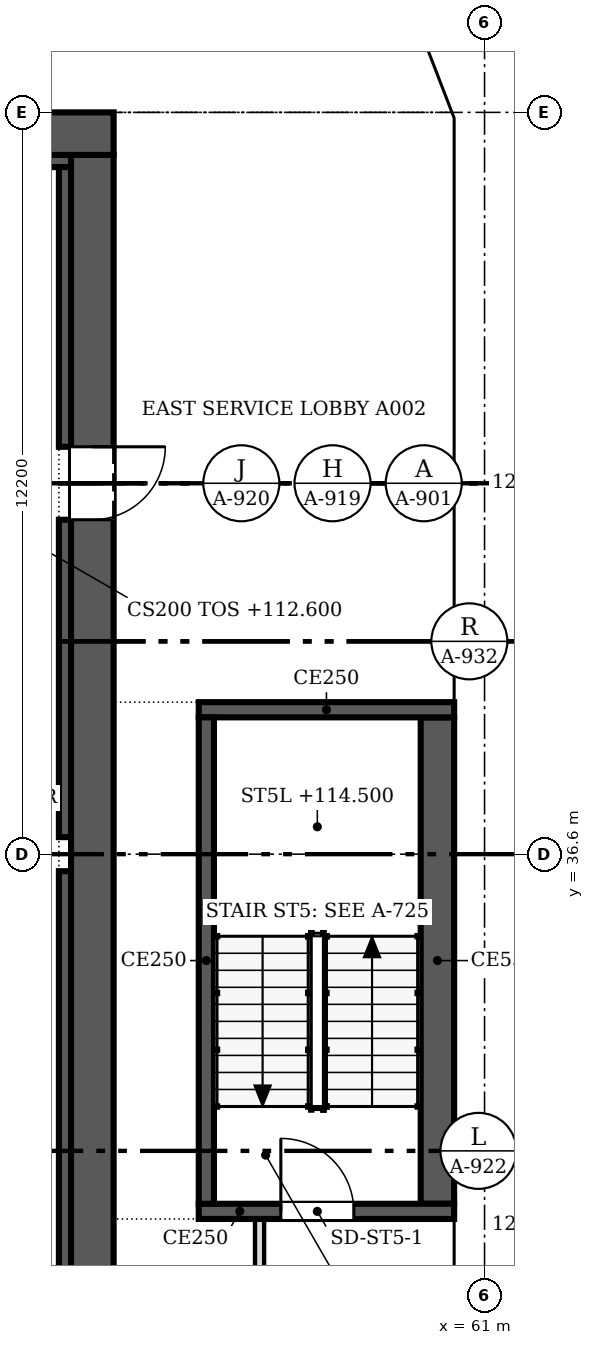
"""IFC4 building model, lengths in metres.
Left out: names, types, materials, properties, quantities, classifications, styles, units other than length and angle.
Written with IfcOpenShell. Run it as: python <this file> out.ifc"""

import sys

from ifc_helpers import new_model, si_unit, direction, frame, frame_2d, origin, place, context, subcontext, project, spatial, polyline, rectangle, outline, extrude, faceted_brep, source, transform, mapped, element, fill, save


model = new_model("IFC4")
c1 = context("Model", 3, precision=1e-05, world=origin(), true_north=direction((0.0, 1.0)))
c2 = subcontext(c1, "Body", "Model", "MODEL_VIEW")
j1 = project(units=[si_unit("LENGTHUNIT", "METRE"), si_unit("PLANEANGLEUNIT", "RADIAN")], contexts=[c1])
p1 = place(None, origin())
s1 = spatial("IfcSite", under=j1, at=p1, CompositionType="ELEMENT")
p2 = place(p1, origin())
s2 = spatial("IfcBuilding", under=s1, at=p2, CompositionType="ELEMENT")
p3 = place(p2, frame((0.0, 0.0, 112.6)))
s3 = spatial("IfcBuildingStorey", under=s2, at=p3, CompositionType="ELEMENT", Elevation=112.6)
m1 = source(origin(), c2, "Body", "SweptSolid", [
    extrude(outline(polyline([(6.1, 0.0), (3.05, 3.8), (0.0, 0.0), (6.1, 0.0)])), frame((0.0, 0.25, 0.0), z_axis=(0.0, -1.0, 0.0), x_axis=(1.0, 0.0, 0.0)), (0.0, 0.0, 1.0), 0.5),
])
p4 = place(p3, frame((60.75, 24.4, 0.0), z_axis=(0.0, 0.0, 1.0), x_axis=(0.0, 1.0, 0.0)))
e1 = element("IfcWall", 1, at=p4, inside=s3, PredefinedType="SOLIDWALL", context=c2, shape_type="MappedRepresentation", body=[
    mapped(m1, transform((0.0, 0.0, 0.0), scale=1.0)),
])
m2 = source(origin(), c2, "Body", "SweptSolid", [
    extrude(outline(polyline([(5.579, 0.25), (3.05, 3.4), (0.521, 0.25), (5.579, 0.25)])), frame((0.0, 0.26, 0.0), z_axis=(0.0, -1.0, 0.0), x_axis=(1.0, 0.0, 0.0)), (0.0, 0.0, 1.0), 0.52),
])
p5 = place(p4, origin())
e2 = element("IfcOpeningElement", 2, at=p5, cuts=e1, PredefinedType="OPENING", context=c2, shape_type="MappedRepresentation", body=[
    mapped(m2, transform((0.0, 0.0, 0.0), scale=1.0)),
])
p6 = place(p3, frame((60.75, 30.5, 0.0), z_axis=(0.0, 0.0, 1.0), x_axis=(0.0, 1.0, 0.0)))
e3 = element("IfcWall", 3, at=p6, inside=s3, PredefinedType="SOLIDWALL", context=c2, shape_type="MappedRepresentation", body=[
    mapped(m1, transform((0.0, 0.0, 0.0), scale=1.0)),
])
p7 = place(p6, origin())
e4 = element("IfcOpeningElement", 4, at=p7, cuts=e3, PredefinedType="OPENING", context=c2, shape_type="MappedRepresentation", body=[
    mapped(m2, transform((0.0, 0.0, 0.0), scale=1.0)),
])
m3 = source(origin(), c2, "Body", "Brep", [
    faceted_brep([(6.1, -0.25, 0.0), (3.05, -0.25, 3.8), (0.0, -0.25, 0.0), (6.1, -0.25, 0.0), (0.0, 0.25, 0.0), (3.05, 0.25, 3.8), (6.1, 0.25, 0.0), (6.1, 0.25, 0.0)], [[[0, 1, 2, 3]], [[4, 5, 6, 7]], [[6, 5, 1, 0]], [[5, 4, 2, 1]], [[4, 7, 3, 2]], [[3, 7, 6, 0]]]),
])
p8 = place(p3, frame((60.75, 36.6, 0.0), z_axis=(0.0, 0.0, 1.0), x_axis=(0.0, 1.0, 0.0)))
e5 = element("IfcWall", 5, at=p8, inside=s3, PredefinedType="SOLIDWALL", context=c2, shape_type="MappedRepresentation", body=[
    mapped(m3, transform((0.0, 0.0, 0.0), scale=1.0)),
])
p9 = place(p8, origin())
e6 = element("IfcOpeningElement", 6, at=p9, cuts=e5, PredefinedType="OPENING", context=c2, shape_type="MappedRepresentation", body=[
    mapped(m2, transform((0.0, 0.0, 0.0), scale=1.0)),
])
m4 = source(origin(), c2, "Body", "Brep", [
    faceted_brep([(6.053, -0.25, 0.0), (3.05, -0.25, 3.8), (0.0, -0.25, 0.0), (0.0, 0.25, 0.0), (3.05, 0.25, 3.8), (6.007, 0.25, 0.059), (6.007, 0.25, 0.0), (6.053, 0.0, 0.0)], [[[0, 1, 2]], [[3, 4, 5, 6]], [[5, 4, 1, 0, 7]], [[4, 3, 2, 1]], [[3, 6, 7, 0, 2]], [[7, 6, 5]]]),
])
p10 = place(p3, frame((60.75, 42.7, 0.0), z_axis=(0.0, 0.0, 1.0), x_axis=(0.0, 1.0, 0.0)))
e7 = element("IfcWall", 7, at=p10, inside=s3, PredefinedType="SOLIDWALL", context=c2, shape_type="MappedRepresentation", body=[
    mapped(m4, transform((0.0, 0.0, 0.0), scale=1.0)),
])
m5 = source(origin(), c2, "Body", "SweptSolid", [
    extrude(outline(polyline([(5.537, 0.25), (3.049, 3.399), (0.521, 0.25), (5.537, 0.25)])), frame((0.0, 0.26, 0.0), z_axis=(0.0, -1.0, 0.0), x_axis=(1.0, 0.0, 0.0)), (0.0, 0.0, 1.0), 0.52),
])
p11 = place(p10, origin())
e8 = element("IfcOpeningElement", 8, at=p11, cuts=e7, PredefinedType="OPENING", context=c2, shape_type="MappedRepresentation", body=[
    mapped(m5, transform((0.0, 0.0, 0.0), scale=1.0)),
])
m6 = source(origin(), c2, "Body", "Brep", [
    faceted_brep([(3.003, -0.25, 3.731), (2.95, -0.25, 3.8), (0.0, -0.25, 0.0), (3.003, -0.25, 0.0), (0.047, 0.25, 0.06), (2.898, 0.25, 3.732), (2.898, 0.25, 0.0), (0.047, 0.25, 0.0), (2.95, 0.0, 3.8), (0.0, 0.0, 0.0)], [[[0, 1, 2, 3]], [[4, 5, 6, 7]], [[8, 1, 0]], [[5, 4, 9, 2, 1, 8]], [[7, 6, 3, 2, 9]], [[7, 9, 4]], [[3, 6, 5, 8, 0]]]),
])
p12 = place(p3, frame((60.75, 48.753, 0.0), z_axis=(0.0, 0.0, 1.0), x_axis=(-0.35992665181, 0.932980602862, 0.0)))
e9 = element("IfcWall", 9, at=p12, inside=s3, PredefinedType="SOLIDWALL", context=c2, shape_type="MappedRepresentation", body=[
    mapped(m6, transform((0.0, 0.0, 0.0), scale=1.0)),
])
m7 = source(origin(), c2, "Body", "SweptSolid", [
    extrude(outline(polyline([(2.75, 3.135), (0.511, 0.25), (2.75, 0.25), (2.75, 3.135)])), frame((0.0, 0.26, 0.0), z_axis=(0.0, -1.0, 0.0), x_axis=(1.0, 0.0, 0.0)), (0.0, 0.0, 1.0), 0.52),
])
p13 = place(p12, origin())
e10 = element("IfcOpeningElement", 10, at=p13, cuts=e9, PredefinedType="OPENING", context=c2, shape_type="MappedRepresentation", body=[
    mapped(m7, transform((0.0, 0.0, 0.0), scale=1.0)),
])
p14 = place(p2, frame((0.0, 0.0, 116.4)))
s4 = spatial("IfcBuildingStorey", under=s2, at=p14, CompositionType="ELEMENT", Elevation=116.4)
m8 = source(origin(), c2, "Body", "SweptSolid", [
    extrude(outline(polyline([(3.05, 0.0), (6.1, 3.8), (3.05, 7.6), (0.0, 3.8), (3.05, 0.0)])), frame((0.0, 0.25, 0.0), z_axis=(0.0, -1.0, 0.0), x_axis=(1.0, 0.0, 0.0)), (0.0, 0.0, 1.0), 0.5),
])
p15 = place(p14, frame((60.75, 27.45, -3.8), z_axis=(0.0, 0.0, 1.0), x_axis=(0.0, 1.0, 0.0)))
e11 = element("IfcWall", 11, at=p15, inside=s4, PredefinedType="SOLIDWALL", context=c2, shape_type="MappedRepresentation", body=[
    mapped(m8, transform((0.0, 0.0, 0.0), scale=1.0)),
])
m9 = source(origin(), c2, "Body", "SweptSolid", [
    extrude(outline(polyline([(3.05, 0.399), (5.78, 3.8), (3.05, 7.2), (0.321, 3.8), (3.05, 0.399)])), frame((0.0, 0.26, 0.0), z_axis=(0.0, -1.0, 0.0), x_axis=(1.0, 0.0, 0.0)), (0.0, 0.0, 1.0), 0.52),
])
p16 = place(p15, origin())
e12 = element("IfcOpeningElement", 12, at=p16, cuts=e11, PredefinedType="OPENING", context=c2, shape_type="MappedRepresentation", body=[
    mapped(m9, transform((0.0, 0.0, 0.0), scale=1.0)),
])
m10 = source(origin(), c2, "Body", "Brep", [
    faceted_brep([(3.05, -0.25, 0.0), (6.1, -0.25, 3.8), (6.1, -0.25, 3.8), (3.05, -0.25, 7.6), (0.0, -0.25, 3.8), (0.0, 0.25, 3.8), (3.05, 0.25, 7.6), (6.1, 0.25, 3.8), (6.1, 0.25, 3.8), (3.05, 0.25, 0.0)], [[[0, 1, 2, 3, 4]], [[5, 6, 7, 8, 9]], [[9, 8, 1, 0]], [[7, 6, 3, 2]], [[6, 5, 4, 3]], [[5, 9, 0, 4]], [[1, 8, 7, 2]]]),
])
p17 = place(p14, frame((60.75, 33.55, -3.8), z_axis=(0.0, 0.0, 1.0), x_axis=(0.0, 1.0, 0.0)))
e13 = element("IfcWall", 13, at=p17, inside=s4, PredefinedType="SOLIDWALL", context=c2, shape_type="MappedRepresentation", body=[
    mapped(m10, transform((0.0, 0.0, 0.0), scale=1.0)),
])
p18 = place(p17, origin())
e14 = element("IfcOpeningElement", 14, at=p18, cuts=e13, PredefinedType="OPENING", context=c2, shape_type="MappedRepresentation", body=[
    mapped(m9, transform((0.0, 0.0, 0.0), scale=1.0)),
])
p19 = place(p14, frame((60.75, 39.65, -3.8), z_axis=(0.0, 0.0, 1.0), x_axis=(0.0, 1.0, 0.0)))
e15 = element("IfcWall", 15, at=p19, inside=s4, PredefinedType="SOLIDWALL", context=c2, shape_type="MappedRepresentation", body=[
    mapped(m8, transform((0.0, 0.0, 0.0), scale=1.0)),
])
p20 = place(p19, origin())
e16 = element("IfcOpeningElement", 16, at=p20, cuts=e15, PredefinedType="OPENING", context=c2, shape_type="MappedRepresentation", body=[
    mapped(m9, transform((0.0, 0.0, 0.0), scale=1.0)),
])
m11 = source(origin(), c2, "Body", "Brep", [
    faceted_brep([(3.003, -0.25, 0.0), (3.05, -0.25, 0.06), (3.05, -0.25, 7.54), (3.003, -0.25, 7.6), (0.0, -0.25, 3.8), (0.0, 0.25, 3.8), (2.957, 0.25, 7.541), (2.957, 0.25, 0.059), (3.003, 0.0, 0.0), (3.003, 0.0, 7.6)], [[[0, 1, 2, 3, 4]], [[5, 6, 7]], [[1, 0, 8]], [[9, 3, 2]], [[6, 5, 4, 3, 9]], [[5, 7, 8, 0, 4]], [[1, 8, 7, 6, 9, 2]]]),
])
p21 = place(p14, frame((60.75, 45.75, -3.8), z_axis=(0.0, 0.0, 1.0), x_axis=(0.0, 1.0, 0.0)))
e17 = element("IfcWall", 17, at=p21, inside=s4, PredefinedType="SOLIDWALL", context=c2, shape_type="MappedRepresentation", body=[
    mapped(m11, transform((0.0, 0.0, 0.0), scale=1.0)),
])
m12 = source(origin(), c2, "Body", "SweptSolid", [
    extrude(outline(polyline([(2.803, 6.944), (0.319, 3.8), (2.803, 0.656), (2.803, 6.944)])), frame((0.0, 0.26, 0.0), z_axis=(0.0, -1.0, 0.0), x_axis=(1.0, 0.0, 0.0)), (0.0, 0.0, 1.0), 0.52),
])
p22 = place(p21, origin())
e18 = element("IfcOpeningElement", 18, at=p22, cuts=e17, PredefinedType="OPENING", context=c2, shape_type="MappedRepresentation", body=[
    mapped(m12, transform((0.0, 0.0, 0.0), scale=1.0)),
])
m13 = source(origin(), c2, "Body", "Brep", [
    faceted_brep([(0.047, -0.25, 0.0), (2.997, -0.25, 3.8), (0.047, -0.25, 7.6), (0.0, -0.25, 7.541), (0.0, -0.25, 0.059), (0.093, 0.25, 7.54), (2.944, 0.25, 3.868), (2.944, 0.25, 3.732), (0.093, 0.25, 0.06), (2.997, 0.0, 3.8), (0.047, 0.0, 0.0), (0.047, 0.0, 7.6)], [[[0, 1, 2, 3, 4]], [[5, 6, 7, 8]], [[8, 7, 9, 1, 0, 10]], [[6, 5, 11, 2, 1, 9]], [[3, 2, 11]], [[10, 0, 4]], [[8, 10, 4, 3, 11, 5]], [[9, 7, 6]]]),
])
p23 = place(p14, frame((60.767, 48.71, -3.8), z_axis=(0.0, 0.0, 1.0), x_axis=(-0.359901446078, 0.932990326376, 0.0)))
e19 = element("IfcWall", 19, at=p23, inside=s4, PredefinedType="SOLIDWALL", context=c2, shape_type="MappedRepresentation", body=[
    mapped(m13, transform((0.0, 0.0, 0.0), scale=1.0)),
])
m14 = source(origin(), c2, "Body", "SweptSolid", [
    extrude(outline(polyline([(0.247, 0.665), (2.681, 3.8), (0.247, 6.935), (0.247, 0.665)])), frame((0.0, 0.26, 0.0), z_axis=(0.0, -1.0, 0.0), x_axis=(1.0, 0.0, 0.0)), (0.0, 0.0, 1.0), 0.52),
])
p24 = place(p23, origin())
e20 = element("IfcOpeningElement", 20, at=p24, cuts=e19, PredefinedType="OPENING", context=c2, shape_type="MappedRepresentation", body=[
    mapped(m14, transform((0.0, 0.0, 0.0), scale=1.0)),
])
p25 = place(p3, frame((30.5, 48.45, 0.0), z_axis=(0.0, 0.0, 1.0), x_axis=(1.0, 0.0, 0.0)))
e21 = element("IfcWall", 21, at=p25, inside=s3, PredefinedType="SHEAR", context=c2, shape_type="SweptSolid", body=[
    extrude(rectangle(XDim=24.4, YDim=0.7, at=frame_2d((12.2, 0.0))), origin(), (0.0, 0.0, 1.0), 3.8),
])
p26 = place(p3, frame((54.55, 48.1, 0.0), z_axis=(0.0, 0.0, 1.0), x_axis=(0.0, -1.0, 0.0)))
e22 = element("IfcWall", 22, at=p26, inside=s3, PredefinedType="SHEAR", context=c2, shape_type="SweptSolid", body=[
    extrude(rectangle(XDim=23.0, YDim=0.7, at=frame_2d((11.5, 0.0))), origin(), (0.0, 0.0, 1.0), 3.8),
])
m15 = source(origin(), c2, "Body", "SweptSolid", [
    extrude(rectangle(XDim=1.2, YDim=2.1, at=frame_2d((0.6, 1.05))), frame((0.0, 0.36, 0.0), z_axis=(0.0, -1.0, 0.0), x_axis=(1.0, 0.0, 0.0)), (0.0, 0.0, 1.0), 0.72),
])
p27 = place(p26, frame((4.8, 0.0, 0.0)))
e23 = element("IfcOpeningElement", 23, at=p27, cuts=e22, PredefinedType="OPENING", context=c2, shape_type="MappedRepresentation", body=[
    mapped(m15, transform((0.0, 0.0, 0.0), scale=1.0)),
])
p28 = place(p3, frame((31.2, 48.0, 0.0), z_axis=(0.0, 0.0, 1.0), x_axis=(1.0, 0.0, 0.0)))
e24 = element("IfcWall", 24, at=p28, inside=s3, PredefinedType="SOLIDWALL", context=c2, shape_type="SweptSolid", body=[
    extrude(rectangle(XDim=23.0, YDim=0.2, at=frame_2d((11.5, 0.0))), origin(), (0.0, 0.0, 1.0), 3.8),
])
p29 = place(p3, frame((54.1, 25.3, 0.0), z_axis=(0.0, 0.0, 1.0), x_axis=(0.0, 1.0, 0.0)))
e25 = element("IfcWall", 25, at=p29, inside=s3, PredefinedType="SOLIDWALL", context=c2, shape_type="SweptSolid", body=[
    extrude(rectangle(XDim=11.02, YDim=0.2, at=frame_2d((5.51, 0.0))), origin(), (0.0, 0.0, 1.0), 3.8),
])
p30 = place(p3, frame((54.1, 36.88, 0.0), z_axis=(0.0, 0.0, 1.0), x_axis=(0.0, 1.0, 0.0)))
e26 = element("IfcWall", 26, at=p30, inside=s3, PredefinedType="SOLIDWALL", context=c2, shape_type="SweptSolid", body=[
    extrude(rectangle(XDim=5.22, YDim=0.2, at=frame_2d((2.61, 0.0))), origin(), (0.0, 0.0, 1.0), 3.8),
])
p31 = place(p3, frame((54.1, 43.3, 0.0), z_axis=(0.0, 0.0, 1.0), x_axis=(0.0, 1.0, 0.0)))
e27 = element("IfcWall", 27, at=p31, inside=s3, PredefinedType="SOLIDWALL", context=c2, shape_type="SweptSolid", body=[
    extrude(rectangle(XDim=4.6, YDim=0.2, at=frame_2d((2.3, 0.0))), origin(), (0.0, 0.0, 1.0), 3.8),
])
p32 = place(p3, frame((60.5, 30.725, 0.0), z_axis=(0.0, 0.0, 1.0), x_axis=(-1.0, 0.0, 0.0)))
e28 = element("IfcWall", 28, at=p32, inside=s3, PredefinedType="SOLIDWALL", context=c2, shape_type="SweptSolid", body=[
    extrude(rectangle(XDim=4.2, YDim=0.25, at=frame_2d((2.1, 0.0))), origin(), (0.0, 0.0, 1.0), 3.8),
])
m16 = source(origin(), c2, "Body", "SweptSolid", [
    extrude(rectangle(XDim=1.2, YDim=2.1, at=frame_2d((0.6, 1.05))), frame((0.0, 0.135, 0.0), z_axis=(0.0, -1.0, 0.0), x_axis=(1.0, 0.0, 0.0)), (0.0, 0.0, 1.0), 0.27),
])
p33 = place(p32, frame((1.65, 0.0, 0.0)))
e29 = element("IfcOpeningElement", 29, at=p33, cuts=e28, PredefinedType="OPENING", context=c2, shape_type="MappedRepresentation", body=[
    mapped(m16, transform((0.0, 0.0, 0.0), scale=1.0)),
])
p34 = place(p3, frame((56.425, 30.85, 0.0), z_axis=(0.0, 0.0, 1.0), x_axis=(0.0, 1.0, 0.0)))
e30 = element("IfcWall", 30, at=p34, inside=s3, PredefinedType="SOLIDWALL", context=c2, shape_type="SweptSolid", body=[
    extrude(rectangle(XDim=8.0, YDim=0.25, at=frame_2d((4.0, 0.0))), origin(), (0.0, 0.0, 1.0), 3.8),
])
p35 = place(p3, frame((56.3, 38.975, 0.0), z_axis=(0.0, 0.0, 1.0), x_axis=(1.0, 0.0, 0.0)))
e31 = element("IfcWall", 31, at=p35, inside=s3, PredefinedType="SOLIDWALL", context=c2, shape_type="SweptSolid", body=[
    extrude(rectangle(XDim=4.2, YDim=0.25, at=frame_2d((2.1, 0.0))), origin(), (0.0, 0.0, 1.0), 3.8),
])
p36 = place(p3, frame((60.225, 38.85, 0.0), z_axis=(0.0, 0.0, 1.0), x_axis=(0.0, -1.0, 0.0)))
e32 = element("IfcWall", 32, at=p36, inside=s3, PredefinedType="SOLIDWALL", context=c2, shape_type="SweptSolid", body=[
    extrude(rectangle(XDim=8.0, YDim=0.55, at=frame_2d((4.0, 0.0))), origin(), (0.0, 0.0, 1.0), 3.8),
])
p37 = place(p3, frame((57.3, 30.6, 0.0), z_axis=(0.0, 0.0, 1.0), x_axis=(0.0, -1.0, 0.0)))
e33 = element("IfcWall", 33, at=p37, inside=s3, PredefinedType="PARTITIONING", context=c2, shape_type="SweptSolid", body=[
    extrude(rectangle(XDim=8.524, YDim=0.15, at=frame_2d((4.262, 0.0))), origin(), (0.0, 0.0, 1.0), 3.067),
])
m17 = source(origin(), c2, "Body", "SweptSolid", [
    extrude(rectangle(XDim=0.9, YDim=2.1, at=frame_2d((0.45, 1.05))), frame((0.0, 0.085, 0.0), z_axis=(0.0, -1.0, 0.0), x_axis=(1.0, 0.0, 0.0)), (0.0, 0.0, 1.0), 0.17),
])
p38 = place(p37, frame((3.824, 0.0, 0.0)))
e34 = element("IfcOpeningElement", 34, at=p38, cuts=e33, PredefinedType="OPENING", context=c2, shape_type="MappedRepresentation", body=[
    mapped(m17, transform((0.0, 0.0, 0.0), scale=1.0)),
])
m18 = source(origin(), c2, "Body", "SweptSolid", [
    extrude(rectangle(XDim=1.2, YDim=2.1, at=frame_2d((0.6, 1.05))), frame((0.0, 0.025, 0.0), z_axis=(0.0, -1.0, 0.0), x_axis=(1.0, 0.0, 0.0)), (0.0, 0.0, 1.0), 0.05),
])
p39 = place(p27, origin())
e35 = element("IfcDoor", 35, at=p39, inside=s3, OperationType="SINGLE_SWING_LEFT", PredefinedType="DOOR", context=c2, shape_type="MappedRepresentation", body=[
    mapped(m18, transform((0.0, 0.0, 0.0), scale=1.0)),
])
fill(e23, e35)
p40 = place(p33, origin())
e36 = element("IfcDoor", 36, at=p40, inside=s3, OperationType="SINGLE_SWING_RIGHT", PredefinedType="DOOR", context=c2, shape_type="MappedRepresentation", body=[
    mapped(m18, transform((0.0, 0.0, 0.0), scale=1.0)),
])
fill(e29, e36)
save(model, sys.argv[1])
